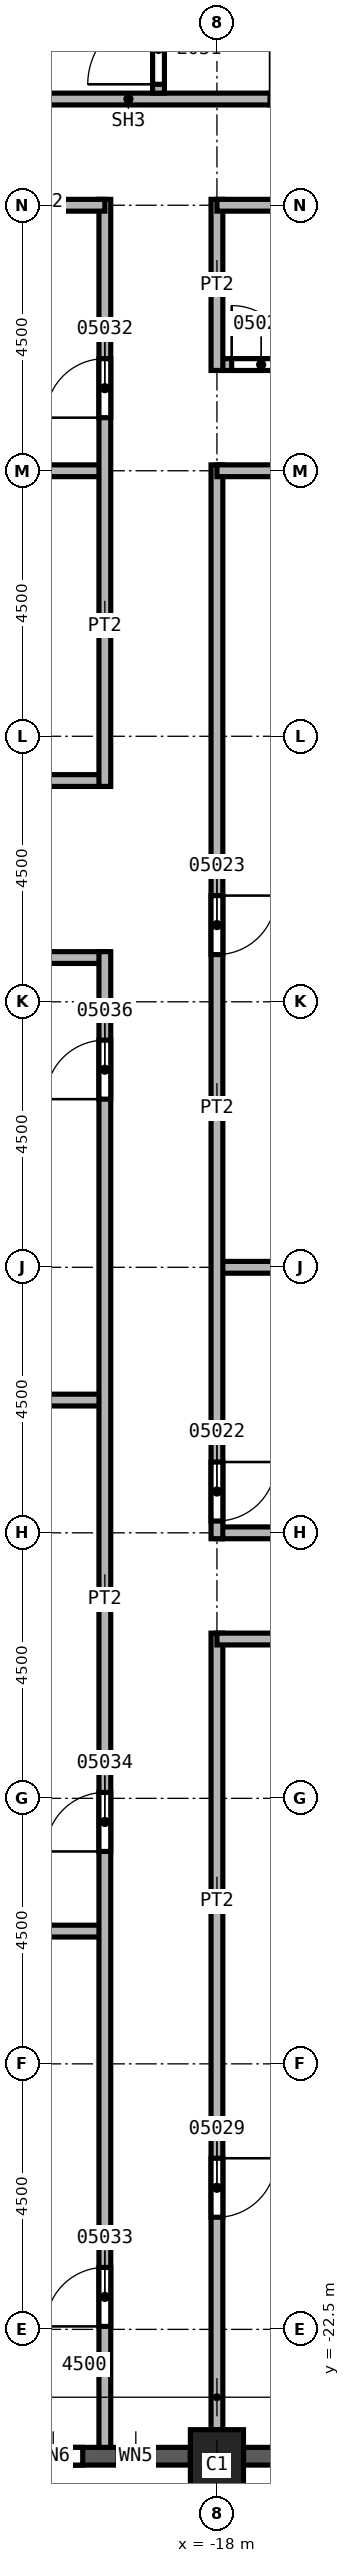
"""IFC4 building model, lengths in metres.
Left out: names, types, materials, properties, quantities, classifications, styles, units other than length and angle.
Written with IfcOpenShell. Run it as: python <this file> out.ifc"""

import sys

from ifc_helpers import new_model, si_unit, direction, frame, frame_2d, origin, origin_2d, place, context, subcontext, project, spatial, rectangle, extrude, element, fill, save


model = new_model("IFC4")
c1 = context("Model", 3, precision=1e-05, world=origin(), true_north=direction((0.0, 1.0)))
c2 = subcontext(c1, "Body", "Model", "MODEL_VIEW")
j1 = project(units=[si_unit("LENGTHUNIT", "METRE"), si_unit("PLANEANGLEUNIT", "RADIAN")], contexts=[c1])
p1 = place(None, origin())
s1 = spatial("IfcSite", under=j1, at=p1, CompositionType="ELEMENT")
p2 = place(p1, origin())
s2 = spatial("IfcBuilding", under=s1, at=p2, CompositionType="ELEMENT")
p3 = place(p2, frame((0.0, 0.0, 112.0)))
s3 = spatial("IfcBuildingStorey", under=s2, at=p3, CompositionType="ELEMENT", Elevation=112.0)
p4 = place(p3, frame((-18.0, -24.8, 0.0), z_axis=(0.0, 0.0, 1.0), x_axis=(1.0, 0.0, 0.0)))
e1 = element("IfcColumn", 1, at=p4, inside=s3, PredefinedType="COLUMN", context=c2, shape_type="SweptSolid", body=[
    extrude(rectangle(XDim=0.9, YDim=1.2, at=origin_2d()), origin(), (0.0, 0.0, 1.0), 3.7),
])
p5 = place(p3, frame((-22.05, -24.65, 0.0), z_axis=(0.0, 0.0, 1.0), x_axis=(1.0, 0.0, 0.0)))
e2 = element("IfcWall", 2, at=p5, inside=s3, PredefinedType="SOLIDWALL", context=c2, shape_type="SweptSolid", body=[
    extrude(rectangle(XDim=3.6, YDim=0.3, at=frame_2d((1.8, 0.0))), origin(), (0.0, 0.0, 1.0), 3.1),
])
p6 = place(p5, frame((0.775, 0.0, 0.8)))
e3 = element("IfcOpeningElement", 3, at=p6, cuts=e2, PredefinedType="OPENING", context=c2, shape_type="SweptSolid", body=[
    extrude(rectangle(XDim=1.0, YDim=1.95, at=frame_2d((0.5, 0.975))), frame((0.0, 0.15, 0.0), z_axis=(0.0, -1.0, 0.0), x_axis=(1.0, 0.0, 0.0)), (0.0, 0.0, 1.0), 0.3),
])
p7 = place(p5, frame((2.375, 0.0, 0.8)))
e4 = element("IfcOpeningElement", 4, at=p7, cuts=e2, PredefinedType="OPENING", context=c2, shape_type="SweptSolid", body=[
    extrude(rectangle(XDim=0.6, YDim=1.95, at=frame_2d((0.3, 0.975))), frame((0.0, 0.15, 0.0), z_axis=(0.0, -1.0, 0.0), x_axis=(1.0, 0.0, 0.0)), (0.0, 0.0, 1.0), 0.3),
])
p8 = place(p3, frame((-17.55, -24.65, 0.0), z_axis=(0.0, 0.0, 1.0), x_axis=(1.0, 0.0, 0.0)))
e5 = element("IfcWall", 5, at=p8, inside=s3, PredefinedType="SOLIDWALL", context=c2, shape_type="SweptSolid", body=[
    extrude(rectangle(XDim=3.6, YDim=0.3, at=frame_2d((1.8, 0.0))), origin(), (0.0, 0.0, 1.0), 3.1),
])
p9 = place(p8, frame((0.6, 0.0, 0.8)))
e6 = element("IfcOpeningElement", 6, at=p9, cuts=e5, PredefinedType="OPENING", context=c2, shape_type="SweptSolid", body=[
    extrude(rectangle(XDim=2.4, YDim=1.95, at=frame_2d((1.2, 0.975))), frame((0.0, 0.15, 0.0), z_axis=(0.0, -1.0, 0.0), x_axis=(1.0, 0.0, 0.0)), (0.0, 0.0, 1.0), 0.3),
])
p10 = place(p3, frame((-33.85, 3.75, 0.0), z_axis=(0.0, 0.0, 1.0), x_axis=(1.0, 0.0, 0.0)))
e7 = element("IfcWall", 7, at=p10, inside=s3, PredefinedType="PARTITIONING", context=c2, shape_type="SweptSolid", body=[
    extrude(rectangle(XDim=13.95, YDim=0.2, at=frame_2d((6.975, 0.0))), origin(), (0.0, 0.0, 1.0), 3.7),
])
p11 = place(p10, frame((9.85, 0.0, 0.0)))
e8 = element("IfcOpeningElement", 8, at=p11, cuts=e7, PredefinedType="OPENING", context=c2, shape_type="SweptSolid", body=[
    extrude(rectangle(XDim=1.0, YDim=2.1, at=frame_2d((0.5, 1.05))), frame((0.0, 0.1, 0.0), z_axis=(0.0, -1.0, 0.0), x_axis=(1.0, 0.0, 0.0)), (0.0, 0.0, 1.0), 0.2),
])
for number, where, z_axis, x_axis in (
    (9, (-27.1, -15.75, 0.0), (0.0, 0.0, 1.0), (1.0, 0.0, 0.0)),
    (10, (-27.1, -6.75, 0.0), (0.0, 0.0, 1.0), (1.0, 0.0, 0.0)),
    (11, (-27.1, 9.0, 0.0), (0.0, 0.0, 1.0), (1.0, 0.0, 0.0)),
):
    element("IfcWall", number, at=place(p3, frame(where, z_axis=z_axis, x_axis=x_axis)), inside=s3, PredefinedType="PARTITIONING", context=c2, shape_type="SweptSolid", body=[
        extrude(rectangle(XDim=7.2, YDim=0.2, at=frame_2d((3.6, 0.0))), origin(), (0.0, 0.0, 1.0), 3.7),
    ])
p12 = place(p3, frame((-19.9, 0.75, 0.0), z_axis=(0.0, 0.0, 1.0), x_axis=(-1.0, 0.0, 0.0)))
e12 = element("IfcWall", 12, at=p12, inside=s3, PredefinedType="PARTITIONING", context=c2, shape_type="SweptSolid", body=[
    extrude(rectangle(XDim=13.95, YDim=0.2, at=frame_2d((6.975, 0.0))), origin(), (0.0, 0.0, 1.0), 3.7),
])
p13 = place(p3, frame((-19.9, -24.5, 0.0), z_axis=(0.0, 0.0, 1.0), x_axis=(0.0, 1.0, 0.0)))
e13 = element("IfcWall", 13, at=p13, inside=s3, PredefinedType="PARTITIONING", context=c2, shape_type="SweptSolid", body=[
    extrude(rectangle(XDim=25.35, YDim=0.2, at=frame_2d((12.675, 0.0))), origin(), (0.0, 0.0, 1.0), 3.7),
])
p14 = place(p13, frame((2.05, 0.0, 0.0)))
e14 = element("IfcOpeningElement", 14, at=p14, cuts=e13, PredefinedType="OPENING", context=c2, shape_type="SweptSolid", body=[
    extrude(rectangle(XDim=1.0, YDim=2.1, at=frame_2d((0.5, 1.05))), frame((0.0, 0.1, 0.0), z_axis=(0.0, -1.0, 0.0), x_axis=(1.0, 0.0, 0.0)), (0.0, 0.0, 1.0), 0.2),
])
p15 = place(p13, frame((10.1, 0.0, 0.0)))
e15 = element("IfcOpeningElement", 15, at=p15, cuts=e13, PredefinedType="OPENING", context=c2, shape_type="SweptSolid", body=[
    extrude(rectangle(XDim=1.0, YDim=2.1, at=frame_2d((0.5, 1.05))), frame((0.0, 0.1, 0.0), z_axis=(0.0, -1.0, 0.0), x_axis=(1.0, 0.0, 0.0)), (0.0, 0.0, 1.0), 0.2),
])
p16 = place(p13, frame((22.85, 0.0, 0.0)))
e16 = element("IfcOpeningElement", 16, at=p16, cuts=e13, PredefinedType="OPENING", context=c2, shape_type="SweptSolid", body=[
    extrude(rectangle(XDim=1.0, YDim=2.1, at=frame_2d((0.5, 1.05))), frame((0.0, 0.1, 0.0), z_axis=(0.0, -1.0, 0.0), x_axis=(1.0, 0.0, 0.0)), (0.0, 0.0, 1.0), 0.2),
])
p17 = place(p3, frame((-19.9, 3.65, 0.0), z_axis=(0.0, 0.0, 1.0), x_axis=(0.0, 1.0, 0.0)))
e17 = element("IfcWall", 17, at=p17, inside=s3, PredefinedType="PARTITIONING", context=c2, shape_type="SweptSolid", body=[
    extrude(rectangle(XDim=9.95, YDim=0.2, at=frame_2d((4.975, 0.0))), origin(), (0.0, 0.0, 1.0), 3.7),
])
p18 = place(p17, frame((6.25, 0.0, 0.0)))
e18 = element("IfcOpeningElement", 18, at=p18, cuts=e17, PredefinedType="OPENING", context=c2, shape_type="SweptSolid", body=[
    extrude(rectangle(XDim=1.0, YDim=2.1, at=frame_2d((0.5, 1.05))), frame((0.0, 0.1, 0.0), z_axis=(0.0, -1.0, 0.0), x_axis=(1.0, 0.0, 0.0)), (0.0, 0.0, 1.0), 0.2),
])
p19 = place(p3, frame((-19.9, 13.5, 0.0), z_axis=(0.0, 0.0, 1.0), x_axis=(-1.0, 0.0, 0.0)))
e19 = element("IfcWall", 19, at=p19, inside=s3, PredefinedType="PARTITIONING", context=c2, shape_type="SweptSolid", body=[
    extrude(rectangle(XDim=2.1, YDim=0.2, at=frame_2d((1.05, 0.0))), origin(), (0.0, 0.0, 1.0), 3.7),
])
p20 = place(p3, frame((-18.0, -10.7, 0.0), z_axis=(0.0, 0.0, 1.0), x_axis=(0.0, -1.0, 0.0)))
e20 = element("IfcWall", 20, at=p20, inside=s3, PredefinedType="PARTITIONING", context=c2, shape_type="SweptSolid", body=[
    extrude(rectangle(XDim=13.5, YDim=0.2, at=frame_2d((6.75, 0.0))), origin(), (0.0, 0.0, 1.0), 3.7),
])
p21 = place(p20, frame((8.9, 0.0, 0.0)))
e21 = element("IfcOpeningElement", 21, at=p21, cuts=e20, PredefinedType="OPENING", context=c2, shape_type="SweptSolid", body=[
    extrude(rectangle(XDim=1.0, YDim=2.1, at=frame_2d((0.5, 1.05))), frame((0.0, 0.1, 0.0), z_axis=(0.0, -1.0, 0.0), x_axis=(1.0, 0.0, 0.0)), (0.0, 0.0, 1.0), 0.2),
])
for number, where, z_axis, x_axis in (
    (22, (-18.0, -9.0, 0.0), (0.0, 0.0, 1.0), (1.0, 0.0, 0.0)),
    (23, (-18.0, -4.5, 0.0), (0.0, 0.0, 1.0), (1.0, 0.0, 0.0)),
):
    element("IfcWall", number, at=place(p3, frame(where, z_axis=z_axis, x_axis=x_axis)), inside=s3, PredefinedType="PARTITIONING", context=c2, shape_type="SweptSolid", body=[
        extrude(rectangle(XDim=4.5, YDim=0.2, at=frame_2d((2.25, 0.0))), origin(), (0.0, 0.0, 1.0), 3.7),
    ])
p22 = place(p3, frame((-18.0, 9.1, 0.0), z_axis=(0.0, 0.0, 1.0), x_axis=(0.0, -1.0, 0.0)))
e24 = element("IfcWall", 24, at=p22, inside=s3, PredefinedType="PARTITIONING", context=c2, shape_type="SweptSolid", body=[
    extrude(rectangle(XDim=18.2, YDim=0.2, at=frame_2d((9.1, 0.0))), origin(), (0.0, 0.0, 1.0), 3.7),
])
p23 = place(p22, frame((16.9, 0.0, 0.0)))
e25 = element("IfcOpeningElement", 25, at=p23, cuts=e24, PredefinedType="OPENING", context=c2, shape_type="SweptSolid", body=[
    extrude(rectangle(XDim=1.0, YDim=2.1, at=frame_2d((0.5, 1.05))), frame((0.0, 0.1, 0.0), z_axis=(0.0, -1.0, 0.0), x_axis=(1.0, 0.0, 0.0)), (0.0, 0.0, 1.0), 0.2),
])
p24 = place(p22, frame((7.3, 0.0, 0.0)))
e26 = element("IfcOpeningElement", 26, at=p24, cuts=e24, PredefinedType="OPENING", context=c2, shape_type="SweptSolid", body=[
    extrude(rectangle(XDim=1.0, YDim=2.1, at=frame_2d((0.5, 1.05))), frame((0.0, 0.1, 0.0), z_axis=(0.0, -1.0, 0.0), x_axis=(1.0, 0.0, 0.0)), (0.0, 0.0, 1.0), 0.2),
])
p25 = place(p3, frame((-18.0, 10.8, 0.0), z_axis=(0.0, 0.0, 1.0), x_axis=(1.0, 0.0, 0.0)))
e27 = element("IfcWall", 27, at=p25, inside=s3, PredefinedType="PARTITIONING", context=c2, shape_type="SweptSolid", body=[
    extrude(rectangle(XDim=3.6, YDim=0.2, at=frame_2d((1.8, 0.0))), origin(), (0.0, 0.0, 1.0), 3.7),
])
p26 = place(p25, frame((0.25, 0.0, 0.0)))
e28 = element("IfcOpeningElement", 28, at=p26, cuts=e27, PredefinedType="OPENING", context=c2, shape_type="SweptSolid", body=[
    extrude(rectangle(XDim=1.0, YDim=2.1, at=frame_2d((0.5, 1.05))), frame((0.0, 0.1, 0.0), z_axis=(0.0, -1.0, 0.0), x_axis=(1.0, 0.0, 0.0)), (0.0, 0.0, 1.0), 0.2),
])
p27 = place(p3, frame((-18.0, 13.6, 0.0), z_axis=(0.0, 0.0, 1.0), x_axis=(0.0, -1.0, 0.0)))
e29 = element("IfcWall", 29, at=p27, inside=s3, PredefinedType="PARTITIONING", context=c2, shape_type="SweptSolid", body=[
    extrude(rectangle(XDim=2.9, YDim=0.2, at=frame_2d((1.45, 0.0))), origin(), (0.0, 0.0, 1.0), 3.7),
])
p28 = place(p3, frame((-15.3, 13.5, 0.0), z_axis=(0.0, 0.0, 1.0), x_axis=(-1.0, 0.0, 0.0)))
e30 = element("IfcWall", 30, at=p28, inside=s3, PredefinedType="PARTITIONING", context=c2, shape_type="SweptSolid", body=[
    extrude(rectangle(XDim=2.7, YDim=0.2, at=frame_2d((1.35, 0.0))), origin(), (0.0, 0.0, 1.0), 3.7),
])
p29 = place(p3, frame((-14.4, -10.8, 0.0), z_axis=(0.0, 0.0, 1.0), x_axis=(-1.0, 0.0, 0.0)))
e31 = element("IfcWall", 31, at=p29, inside=s3, PredefinedType="PARTITIONING", context=c2, shape_type="SweptSolid", body=[
    extrude(rectangle(XDim=3.6, YDim=0.2, at=frame_2d((1.8, 0.0))), origin(), (0.0, 0.0, 1.0), 3.7),
])
p30 = place(p3, frame((-13.5, 9.0, 0.0), z_axis=(0.0, 0.0, 1.0), x_axis=(-1.0, 0.0, 0.0)))
e32 = element("IfcWall", 32, at=p30, inside=s3, PredefinedType="PARTITIONING", context=c2, shape_type="SweptSolid", body=[
    extrude(rectangle(XDim=4.5, YDim=0.2, at=frame_2d((2.25, 0.0))), origin(), (0.0, 0.0, 1.0), 3.7),
])
p31 = place(p3, frame((-21.9, 15.3, 0.0), z_axis=(0.0, 0.0, 1.0), x_axis=(1.0, 0.0, 0.0)))
e33 = element("IfcWall", 33, at=p31, inside=s3, PredefinedType="SOLIDWALL", context=c2, shape_type="SweptSolid", body=[
    extrude(rectangle(XDim=8.275, YDim=0.2, at=frame_2d((4.137, 0.0))), origin(), (0.0, 0.0, 1.0), 3.7),
])
p32 = place(p31, frame((4.8, 0.0, 0.0)))
e34 = element("IfcOpeningElement", 34, at=p32, cuts=e33, PredefinedType="OPENING", context=c2, shape_type="SweptSolid", body=[
    extrude(rectangle(XDim=1.2, YDim=2.1, at=frame_2d((0.6, 1.05))), frame((0.0, 0.1, 0.0), z_axis=(0.0, -1.0, 0.0), x_axis=(1.0, 0.0, 0.0)), (0.0, 0.0, 1.0), 0.2),
])
p33 = place(p3, frame((-18.99, 15.4, 0.0), z_axis=(0.0, 0.0, 1.0), x_axis=(0.0, 1.0, 0.0)))
e35 = element("IfcWall", 35, at=p33, inside=s3, PredefinedType="SOLIDWALL", context=c2, shape_type="SweptSolid", body=[
    extrude(rectangle(XDim=5.9, YDim=0.2, at=frame_2d((2.95, 0.0))), origin(), (0.0, 0.0, 1.0), 3.7),
])
p34 = place(p33, frame((0.15, 0.0, 0.0)))
e36 = element("IfcOpeningElement", 36, at=p34, cuts=e35, PredefinedType="OPENING", context=c2, shape_type="SweptSolid", body=[
    extrude(rectangle(XDim=1.2, YDim=2.1, at=frame_2d((0.6, 1.05))), frame((0.0, 0.1, 0.0), z_axis=(0.0, -1.0, 0.0), x_axis=(1.0, 0.0, 0.0)), (0.0, 0.0, 1.0), 0.2),
])
p35 = place(p23, origin())
e37 = element("IfcDoor", 37, at=p35, inside=s3, OperationType="SINGLE_SWING_LEFT", PredefinedType="DOOR", context=c2, shape_type="SweptSolid", body=[
    extrude(rectangle(XDim=1.0, YDim=2.1, at=frame_2d((0.5, 1.05))), frame((0.0, 0.025, 0.0), z_axis=(0.0, -1.0, 0.0), x_axis=(1.0, 0.0, 0.0)), (0.0, 0.0, 1.0), 0.05),
])
fill(e25, e37)
p36 = place(p24, origin())
e38 = element("IfcDoor", 38, at=p36, inside=s3, OperationType="SINGLE_SWING_RIGHT", PredefinedType="DOOR", context=c2, shape_type="SweptSolid", body=[
    extrude(rectangle(XDim=1.0, YDim=2.1, at=frame_2d((0.5, 1.05))), frame((0.0, 0.025, 0.0), z_axis=(0.0, -1.0, 0.0), x_axis=(1.0, 0.0, 0.0)), (0.0, 0.0, 1.0), 0.05),
])
fill(e26, e38)
p37 = place(p26, origin())
e39 = element("IfcDoor", 39, at=p37, inside=s3, OperationType="SINGLE_SWING_RIGHT", PredefinedType="DOOR", context=c2, shape_type="SweptSolid", body=[
    extrude(rectangle(XDim=1.0, YDim=2.1, at=frame_2d((0.5, 1.05))), frame((0.0, 0.025, 0.0), z_axis=(0.0, -1.0, 0.0), x_axis=(1.0, 0.0, 0.0)), (0.0, 0.0, 1.0), 0.05),
])
fill(e28, e39)
p38 = place(p21, origin())
e40 = element("IfcDoor", 40, at=p38, inside=s3, OperationType="SINGLE_SWING_RIGHT", PredefinedType="DOOR", context=c2, shape_type="SweptSolid", body=[
    extrude(rectangle(XDim=1.0, YDim=2.1, at=frame_2d((0.5, 1.05))), frame((0.0, 0.025, 0.0), z_axis=(0.0, -1.0, 0.0), x_axis=(1.0, 0.0, 0.0)), (0.0, 0.0, 1.0), 0.05),
])
fill(e21, e40)
p39 = place(p18, origin())
e41 = element("IfcDoor", 41, at=p39, inside=s3, OperationType="SINGLE_SWING_LEFT", PredefinedType="DOOR", context=c2, shape_type="SweptSolid", body=[
    extrude(rectangle(XDim=1.0, YDim=2.1, at=frame_2d((0.5, 1.05))), frame((0.0, 0.025, 0.0), z_axis=(0.0, -1.0, 0.0), x_axis=(1.0, 0.0, 0.0)), (0.0, 0.0, 1.0), 0.05),
])
fill(e18, e41)
p40 = place(p14, origin())
e42 = element("IfcDoor", 42, at=p40, inside=s3, OperationType="SINGLE_SWING_RIGHT", PredefinedType="DOOR", context=c2, shape_type="SweptSolid", body=[
    extrude(rectangle(XDim=1.0, YDim=2.1, at=frame_2d((0.5, 1.05))), frame((0.0, 0.025, 0.0), z_axis=(0.0, -1.0, 0.0), x_axis=(1.0, 0.0, 0.0)), (0.0, 0.0, 1.0), 0.05),
])
fill(e14, e42)
p41 = place(p15, origin())
e43 = element("IfcDoor", 43, at=p41, inside=s3, OperationType="SINGLE_SWING_LEFT", PredefinedType="DOOR", context=c2, shape_type="SweptSolid", body=[
    extrude(rectangle(XDim=1.0, YDim=2.1, at=frame_2d((0.5, 1.05))), frame((0.0, 0.025, 0.0), z_axis=(0.0, -1.0, 0.0), x_axis=(1.0, 0.0, 0.0)), (0.0, 0.0, 1.0), 0.05),
])
fill(e15, e43)
p42 = place(p16, origin())
e44 = element("IfcDoor", 44, at=p42, inside=s3, OperationType="SINGLE_SWING_LEFT", PredefinedType="DOOR", context=c2, shape_type="SweptSolid", body=[
    extrude(rectangle(XDim=1.0, YDim=2.1, at=frame_2d((0.5, 1.05))), frame((0.0, 0.025, 0.0), z_axis=(0.0, -1.0, 0.0), x_axis=(1.0, 0.0, 0.0)), (0.0, 0.0, 1.0), 0.05),
])
fill(e16, e44)
p43 = place(p34, origin())
e45 = element("IfcDoor", 45, at=p43, inside=s3, OperationType="SINGLE_SWING_LEFT", PredefinedType="DOOR", context=c2, shape_type="SweptSolid", body=[
    extrude(rectangle(XDim=1.2, YDim=2.1, at=frame_2d((0.6, 1.05))), frame((0.0, 0.025, 0.0), z_axis=(0.0, -1.0, 0.0), x_axis=(1.0, 0.0, 0.0)), (0.0, 0.0, 1.0), 0.05),
])
fill(e36, e45)
p44 = place(p6, origin())
e46 = element("IfcWindow", 46, at=p44, inside=s3, PartitioningType="SINGLE_PANEL", PredefinedType="WINDOW", context=c2, shape_type="SweptSolid", body=[
    extrude(rectangle(XDim=1.0, YDim=1.95, at=frame_2d((0.5, 0.975))), frame((0.0, 0.03, 0.0), z_axis=(0.0, -1.0, 0.0), x_axis=(1.0, 0.0, 0.0)), (0.0, 0.0, 1.0), 0.06),
])
fill(e3, e46)
p45 = place(p7, origin())
e47 = element("IfcWindow", 47, at=p45, inside=s3, PartitioningType="SINGLE_PANEL", PredefinedType="WINDOW", context=c2, shape_type="SweptSolid", body=[
    extrude(rectangle(XDim=0.6, YDim=1.95, at=frame_2d((0.3, 0.975))), frame((0.0, 0.03, 0.0), z_axis=(0.0, -1.0, 0.0), x_axis=(1.0, 0.0, 0.0)), (0.0, 0.0, 1.0), 0.06),
])
fill(e4, e47)
save(model, sys.argv[1])
